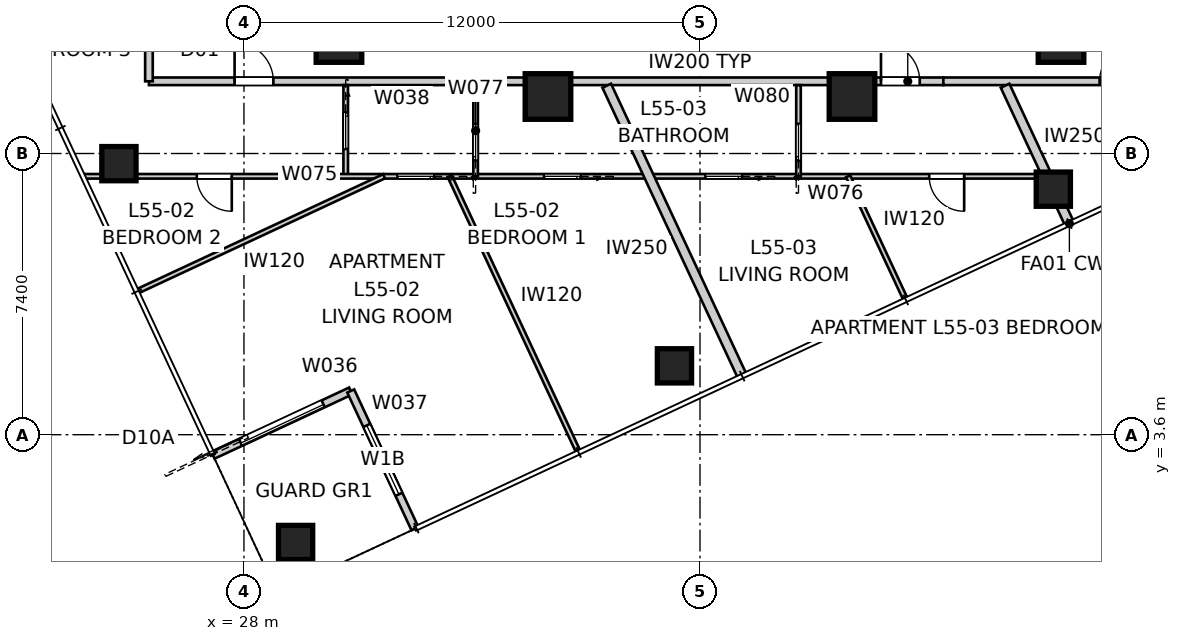
"""IFC4 building model, lengths in metres.
Left out: names, types, materials, properties, quantities, classifications, styles, units other than length and angle.
Written with IfcOpenShell. Run it as: python <this file> out.ifc"""

import sys

from ifc_helpers import new_model, si_unit, direction, frame, frame_2d, origin, origin_2d, place, context, subcontext, project, spatial, rectangle, extrude, element, fill, save


model = new_model("IFC4")
c1 = context("Model", 3, precision=1e-05, world=origin(), true_north=direction((0.0, 1.0)))
c2 = subcontext(c1, "Body", "Model", "MODEL_VIEW")
j1 = project(units=[si_unit("LENGTHUNIT", "METRE"), si_unit("PLANEANGLEUNIT", "RADIAN")], contexts=[c1])
p1 = place(None, origin())
s1 = spatial("IfcSite", under=j1, at=p1, CompositionType="ELEMENT")
p2 = place(p1, origin())
s2 = spatial("IfcBuilding", under=s1, at=p2, CompositionType="ELEMENT")
p3 = place(p2, frame((0.0, 0.0, 199.8)))
s3 = spatial("IfcBuildingStorey", under=s2, at=p3, CompositionType="ELEMENT", Elevation=199.8)
for number, where, z_axis, x_axis in (
    (1, (29.359, 0.764, 0.0), (0.0, 0.0, 1.0), (1.0, 0.0, 0.0)),
    (2, (39.328, 5.412, 0.0), (0.0, 0.0, 1.0), (1.0, 0.0, 0.0)),
    (3, (49.298, 10.061, 0.0), (0.0, 0.0, 1.0), (1.0, 0.0, 0.0)),
    (4, (24.71, 10.733, 0.0), (0.0, 0.0, 1.0), (1.0, 0.0, 0.0)),
):
    element("IfcColumn", number, at=place(p3, frame(where, z_axis=z_axis, x_axis=x_axis)), inside=s3, PredefinedType="COLUMN", context=c2, shape_type="SweptSolid", body=[
        extrude(rectangle(XDim=0.9, YDim=0.9, at=origin_2d()), origin(), (0.0, 0.0, 1.0), 3.2),
    ])
for number, where, z_axis, x_axis in (
    (5, (30.5, 14.0, 0.0), (0.0, 0.0, 1.0), (1.0, 0.0, 0.0)),
    (6, (36.0, 12.5, 0.0), (0.0, 0.0, 1.0), (1.0, 0.0, 0.0)),
    (7, (44.0, 12.5, 0.0), (0.0, 0.0, 1.0), (1.0, 0.0, 0.0)),
    (8, (49.5, 14.0, 0.0), (0.0, 0.0, 1.0), (1.0, 0.0, 0.0)),
):
    element("IfcColumn", number, at=place(p3, frame(where, z_axis=z_axis, x_axis=x_axis)), inside=s3, PredefinedType="COLUMN", context=c2, shape_type="SweptSolid", body=[
        extrude(rectangle(XDim=1.2, YDim=1.2, at=origin_2d()), origin(), (0.0, 0.0, 1.0), 3.4),
    ])
p4 = place(p3, frame((27.185, 3.06, 0.0), z_axis=(0.0, 0.0, 1.0), x_axis=(0.906289140828, 0.422658246362, 0.0)))
e9 = element("IfcWall", 9, at=p4, inside=s3, PredefinedType="SOLIDWALL", context=c2, shape_type="SweptSolid", body=[
    extrude(rectangle(XDim=4.0, YDim=0.2, at=frame_2d((2.0, 0.0))), origin(), (0.0, 0.0, 1.0), 3.2),
])
p5 = place(p4, frame((0.8, 0.0, 0.0)))
e10 = element("IfcOpeningElement", 10, at=p5, cuts=e9, PredefinedType="OPENING", context=c2, shape_type="SweptSolid", body=[
    extrude(rectangle(XDim=2.4, YDim=2.1, at=frame_2d((1.2, 1.05))), frame((0.0, 0.11, 0.0), z_axis=(0.0, -1.0, 0.0), x_axis=(1.0, 0.0, 0.0)), (0.0, 0.0, 1.0), 0.22),
])
p6 = place(p3, frame((30.81, 4.75, 0.0), z_axis=(0.0, 0.0, 1.0), x_axis=(0.422658246362, -0.906289140828, 0.0)))
e11 = element("IfcWall", 11, at=p6, inside=s3, PredefinedType="SOLIDWALL", context=c2, shape_type="SweptSolid", body=[
    extrude(rectangle(XDim=4.0, YDim=0.2, at=frame_2d((2.0, 0.0))), origin(), (0.0, 0.0, 1.0), 3.2),
])
p7 = place(p6, frame((1.0, 0.0, 0.4)))
e12 = element("IfcOpeningElement", 12, at=p7, cuts=e11, PredefinedType="OPENING", context=c2, shape_type="SweptSolid", body=[
    extrude(rectangle(XDim=2.0, YDim=1.8, at=frame_2d((1.0, 0.9))), frame((0.0, 0.11, 0.0), z_axis=(0.0, -1.0, 0.0), x_axis=(1.0, 0.0, 0.0)), (0.0, 0.0, 1.0), 0.22),
])
p8 = place(p3, frame((25.5, 12.9, 0.0), z_axis=(0.0, 0.0, 1.0), x_axis=(1.0, 0.0, 0.0)))
e13 = element("IfcWall", 13, at=p8, inside=s3, PredefinedType="PARTITIONING", context=c2, shape_type="SweptSolid", body=[
    extrude(rectangle(XDim=8.097, YDim=0.2, at=frame_2d((4.048, 0.0))), origin(), (0.0, 0.0, 1.0), 3.2),
])
p9 = place(p8, frame((2.254, 0.0, 0.0)))
e14 = element("IfcOpeningElement", 14, at=p9, cuts=e13, PredefinedType="OPENING", context=c2, shape_type="SweptSolid", body=[
    extrude(rectangle(XDim=1.02, YDim=2.34, at=frame_2d((0.51, 1.17))), frame((0.0, 0.11, 0.0), z_axis=(0.0, -1.0, 0.0), x_axis=(1.0, 0.0, 0.0)), (0.0, 0.0, 1.0), 0.22),
])
p10 = place(p3, frame((33.597, 12.9, 0.0), z_axis=(0.0, 0.0, 1.0), x_axis=(1.0, 0.0, 0.0)))
e15 = element("IfcWall", 15, at=p10, inside=s3, PredefinedType="PARTITIONING", context=c2, shape_type="SweptSolid", body=[
    extrude(rectangle(XDim=1.873, YDim=0.2, at=frame_2d((0.937, 0.0))), origin(), (0.0, 0.0, 1.0), 2.2),
])
p11 = place(p3, frame((35.47, 12.9, 0.0), z_axis=(0.0, 0.0, 1.0), x_axis=(1.0, 0.0, 0.0)))
e16 = element("IfcWall", 16, at=p11, inside=s3, PredefinedType="PARTITIONING", context=c2, shape_type="SweptSolid", body=[
    extrude(rectangle(XDim=9.06, YDim=0.2, at=frame_2d((4.53, 0.0))), origin(), (0.0, 0.0, 1.0), 3.2),
])
p12 = place(p3, frame((44.53, 12.9, 0.0), z_axis=(0.0, 0.0, 1.0), x_axis=(1.0, 0.0, 0.0)))
e17 = element("IfcWall", 17, at=p12, inside=s3, PredefinedType="PARTITIONING", context=c2, shape_type="SweptSolid", body=[
    extrude(rectangle(XDim=1.873, YDim=0.2, at=frame_2d((0.937, 0.0))), origin(), (0.0, 0.0, 1.0), 2.2),
])
p13 = place(p12, frame((0.233, 0.0, 0.0)))
e18 = element("IfcOpeningElement", 18, at=p13, cuts=e17, PredefinedType="OPENING", context=c2, shape_type="SweptSolid", body=[
    extrude(rectangle(XDim=1.02, YDim=2.1, at=frame_2d((0.51, 1.05))), frame((0.0, 0.11, 0.0), z_axis=(0.0, -1.0, 0.0), x_axis=(1.0, 0.0, 0.0)), (0.0, 0.0, 1.0), 0.22),
])
p14 = place(p3, frame((46.403, 12.9, 0.0), z_axis=(0.0, 0.0, 1.0), x_axis=(1.0, 0.0, 0.0)))
e19 = element("IfcWall", 19, at=p14, inside=s3, PredefinedType="PARTITIONING", context=c2, shape_type="SweptSolid", body=[
    extrude(rectangle(XDim=8.097, YDim=0.2, at=frame_2d((4.048, 0.0))), origin(), (0.0, 0.0, 1.0), 3.2),
])
p15 = place(p14, frame((4.112, 0.0, 0.0)))
e20 = element("IfcOpeningElement", 20, at=p15, cuts=e19, PredefinedType="OPENING", context=c2, shape_type="SweptSolid", body=[
    extrude(rectangle(XDim=1.02, YDim=2.34, at=frame_2d((0.51, 1.17))), frame((0.0, 0.11, 0.0), z_axis=(0.0, -1.0, 0.0), x_axis=(1.0, 0.0, 0.0)), (0.0, 0.0, 1.0), 0.22),
])
p16 = place(p3, frame((25.5, 46.7, 0.0), z_axis=(0.0, 0.0, 1.0), x_axis=(0.0, -1.0, 0.0)))
e21 = element("IfcWall", 21, at=p16, inside=s3, PredefinedType="PARTITIONING", context=c2, shape_type="SweptSolid", body=[
    extrude(rectangle(XDim=33.8, YDim=0.2, at=frame_2d((16.9, 0.0))), origin(), (0.0, 0.0, 1.0), 3.2),
])
p17 = place(p16, frame((15.349, 0.0, 0.0)))
e22 = element("IfcOpeningElement", 22, at=p17, cuts=e21, PredefinedType="OPENING", context=c2, shape_type="SweptSolid", body=[
    extrude(rectangle(XDim=1.02, YDim=2.34, at=frame_2d((0.51, 1.17))), frame((0.0, 0.11, 0.0), z_axis=(0.0, -1.0, 0.0), x_axis=(1.0, 0.0, 0.0)), (0.0, 0.0, 1.0), 0.22),
])
p18 = place(p3, frame((49.72, 9.155, 0.0), z_axis=(0.0, 0.0, 1.0), x_axis=(-0.422605017068, 0.906313963011, 0.0)))
e23 = element("IfcWall", 23, at=p18, inside=s3, PredefinedType="PARTITIONING", context=c2, shape_type="SweptSolid", body=[
    extrude(rectangle(XDim=4.003, YDim=0.25, at=frame_2d((2.002, 0.0))), origin(), (0.0, 0.0, 1.0), 3.2),
])
p19 = place(p3, frame((41.11, 5.14, 0.0), z_axis=(0.0, 0.0, 1.0), x_axis=(-0.422625541416, 0.906304392433, 0.0)))
e24 = element("IfcWall", 24, at=p19, inside=s3, PredefinedType="PARTITIONING", context=c2, shape_type="SweptSolid", body=[
    extrude(rectangle(XDim=8.434, YDim=0.25, at=frame_2d((4.217, 0.0))), origin(), (0.0, 0.0, 1.0), 3.2),
])
p20 = place(p3, frame((30.677, 12.8, 0.0), z_axis=(0.0, 0.0, 1.0), x_axis=(0.0, -1.0, 0.0)))
e25 = element("IfcWall", 25, at=p20, inside=s3, PredefinedType="PARTITIONING", context=c2, shape_type="SweptSolid", body=[
    extrude(rectangle(XDim=2.4, YDim=0.12, at=frame_2d((1.2, 0.0))), origin(), (0.0, 0.0, 1.0), 3.2),
])
p21 = place(p20, frame((0.72, 0.0, 0.0)))
e26 = element("IfcOpeningElement", 26, at=p21, cuts=e25, PredefinedType="OPENING", context=c2, shape_type="SweptSolid", body=[
    extrude(rectangle(XDim=0.96, YDim=2.1, at=frame_2d((0.48, 1.05))), frame((0.0, 0.07, 0.0), z_axis=(0.0, -1.0, 0.0), x_axis=(1.0, 0.0, 0.0)), (0.0, 0.0, 1.0), 0.14),
])
p22 = place(p3, frame((49.14, 10.4, 0.0), z_axis=(0.0, 0.0, 1.0), x_axis=(-1.0, 0.0, 0.0)))
e27 = element("IfcWall", 27, at=p22, inside=s3, PredefinedType="PARTITIONING", context=c2, shape_type="SweptSolid", body=[
    extrude(rectangle(XDim=25.333, YDim=0.12, at=frame_2d((12.667, 0.0))), origin(), (0.0, 0.0, 1.0), 3.2),
])
p23 = place(p22, frame((2.188, 0.0, 0.0)))
e28 = element("IfcOpeningElement", 28, at=p23, cuts=e27, PredefinedType="OPENING", context=c2, shape_type="SweptSolid", body=[
    extrude(rectangle(XDim=0.92, YDim=2.34, at=frame_2d((0.46, 1.17))), frame((0.0, 0.07, 0.0), z_axis=(0.0, -1.0, 0.0), x_axis=(1.0, 0.0, 0.0)), (0.0, 0.0, 1.0), 0.14),
])
p24 = place(p22, frame((21.46, 0.0, 0.0)))
e29 = element("IfcOpeningElement", 29, at=p24, cuts=e27, PredefinedType="OPENING", context=c2, shape_type="SweptSolid", body=[
    extrude(rectangle(XDim=0.92, YDim=2.34, at=frame_2d((0.46, 1.17))), frame((0.0, 0.07, 0.0), z_axis=(0.0, -1.0, 0.0), x_axis=(1.0, 0.0, 0.0)), (0.0, 0.0, 1.0), 0.14),
])
p25 = place(p22, frame((8.035, 0.0, 0.0)))
e30 = element("IfcOpeningElement", 30, at=p25, cuts=e27, PredefinedType="OPENING", context=c2, shape_type="SweptSolid", body=[
    extrude(rectangle(XDim=0.96, YDim=2.1, at=frame_2d((0.48, 1.05))), frame((0.0, 0.07, 0.0), z_axis=(0.0, -1.0, 0.0), x_axis=(1.0, 0.0, 0.0)), (0.0, 0.0, 1.0), 0.14),
])
p26 = place(p22, frame((16.14, 0.0, 0.0)))
e31 = element("IfcOpeningElement", 31, at=p26, cuts=e27, PredefinedType="OPENING", context=c2, shape_type="SweptSolid", body=[
    extrude(rectangle(XDim=0.96, YDim=2.1, at=frame_2d((0.48, 1.05))), frame((0.0, 0.07, 0.0), z_axis=(0.0, -1.0, 0.0), x_axis=(1.0, 0.0, 0.0)), (0.0, 0.0, 1.0), 0.14),
])
p27 = place(p22, frame((12.283, 0.0, 0.0)))
e32 = element("IfcOpeningElement", 32, at=p27, cuts=e27, PredefinedType="OPENING", context=c2, shape_type="SweptSolid", body=[
    extrude(rectangle(XDim=0.96, YDim=2.1, at=frame_2d((0.48, 1.05))), frame((0.0, 0.07, 0.0), z_axis=(0.0, -1.0, 0.0), x_axis=(1.0, 0.0, 0.0)), (0.0, 0.0, 1.0), 0.14),
])
p28 = place(p3, frame((34.096, 10.4, 0.0), z_axis=(0.0, 0.0, 1.0), x_axis=(0.0, 1.0, 0.0)))
e33 = element("IfcWall", 33, at=p28, inside=s3, PredefinedType="PARTITIONING", context=c2, shape_type="SweptSolid", body=[
    extrude(rectangle(XDim=2.4, YDim=0.12, at=frame_2d((1.2, 0.0))), origin(), (0.0, 0.0, 1.0), 3.2),
])
p29 = place(p28, frame((0.42, 0.0, 0.0)))
e34 = element("IfcOpeningElement", 34, at=p29, cuts=e33, PredefinedType="OPENING", context=c2, shape_type="SweptSolid", body=[
    extrude(rectangle(XDim=0.96, YDim=2.1, at=frame_2d((0.48, 1.05))), frame((0.0, 0.07, 0.0), z_axis=(0.0, -1.0, 0.0), x_axis=(1.0, 0.0, 0.0)), (0.0, 0.0, 1.0), 0.14),
])
p30 = place(p3, frame((33.417, 10.4, 0.0), z_axis=(0.0, 0.0, 1.0), x_axis=(0.422640876946, -0.90629724105, 0.0)))
e35 = element("IfcWall", 35, at=p30, inside=s3, PredefinedType="PARTITIONING", context=c2, shape_type="SweptSolid", body=[
    extrude(rectangle(XDim=7.979, YDim=0.12, at=frame_2d((3.989, 0.0))), origin(), (0.0, 0.0, 1.0), 3.2),
])
p31 = place(p3, frame((25.213, 7.382, 0.0), z_axis=(0.0, 0.0, 1.0), x_axis=(0.906317589158, 0.422597240388, 0.0)))
e36 = element("IfcWall", 36, at=p31, inside=s3, PredefinedType="PARTITIONING", context=c2, shape_type="SweptSolid", body=[
    extrude(rectangle(XDim=7.142, YDim=0.12, at=frame_2d((3.571, 0.0))), origin(), (0.0, 0.0, 1.0), 3.2),
])
p32 = place(p3, frame((42.592, 10.4, 0.0), z_axis=(0.0, 0.0, 1.0), x_axis=(0.0, 1.0, 0.0)))
e37 = element("IfcWall", 37, at=p32, inside=s3, PredefinedType="PARTITIONING", context=c2, shape_type="SweptSolid", body=[
    extrude(rectangle(XDim=2.4, YDim=0.12, at=frame_2d((1.2, 0.0))), origin(), (0.0, 0.0, 1.0), 3.2),
])
p33 = place(p32, frame((0.42, 0.0, 0.0)))
e38 = element("IfcOpeningElement", 38, at=p33, cuts=e37, PredefinedType="OPENING", context=c2, shape_type="SweptSolid", body=[
    extrude(rectangle(XDim=0.96, YDim=2.1, at=frame_2d((0.48, 1.05))), frame((0.0, 0.07, 0.0), z_axis=(0.0, -1.0, 0.0), x_axis=(1.0, 0.0, 0.0)), (0.0, 0.0, 1.0), 0.14),
])
p34 = place(p3, frame((43.899, 10.4, 0.0), z_axis=(0.0, 0.0, 1.0), x_axis=(0.42263686638, -0.906299111318, 0.0)))
e39 = element("IfcWall", 39, at=p34, inside=s3, PredefinedType="PARTITIONING", context=c2, shape_type="SweptSolid", body=[
    extrude(rectangle(XDim=3.549, YDim=0.12, at=frame_2d((1.774, 0.0))), origin(), (0.0, 0.0, 1.0), 3.2),
])
p35 = place(p5, origin())
e40 = element("IfcDoor", 40, at=p35, inside=s3, OperationType="SLIDING_TO_LEFT", PredefinedType="DOOR", context=c2, shape_type="SweptSolid", body=[
    extrude(rectangle(XDim=2.4, YDim=2.1, at=frame_2d((1.2, 1.05))), frame((0.0, 0.025, 0.0), z_axis=(0.0, -1.0, 0.0), x_axis=(1.0, 0.0, 0.0)), (0.0, 0.0, 1.0), 0.05),
])
fill(e10, e40)
p36 = place(p7, origin())
e41 = element("IfcWindow", 41, at=p36, inside=s3, PartitioningType="SINGLE_PANEL", PredefinedType="WINDOW", context=c2, shape_type="SweptSolid", body=[
    extrude(rectangle(XDim=2.0, YDim=1.8, at=frame_2d((1.0, 0.9))), frame((0.0, 0.03, 0.0), z_axis=(0.0, -1.0, 0.0), x_axis=(1.0, 0.0, 0.0)), (0.0, 0.0, 1.0), 0.06),
])
fill(e12, e41)
p37 = place(p15, origin())
e42 = element("IfcDoor", 42, at=p37, inside=s3, OperationType="SINGLE_SWING_RIGHT", PredefinedType="DOOR", context=c2, shape_type="SweptSolid", body=[
    extrude(rectangle(XDim=1.02, YDim=2.34, at=frame_2d((0.51, 1.17))), frame((0.0, 0.025, 0.0), z_axis=(0.0, -1.0, 0.0), x_axis=(1.0, 0.0, 0.0)), (0.0, 0.0, 1.0), 0.05),
])
fill(e20, e42)
p38 = place(p13, origin())
e43 = element("IfcDoor", 43, at=p38, inside=s3, OperationType="SINGLE_SWING_LEFT", PredefinedType="DOOR", context=c2, shape_type="SweptSolid", body=[
    extrude(rectangle(XDim=1.02, YDim=2.1, at=frame_2d((0.51, 1.05))), frame((0.0, 0.025, 0.0), z_axis=(0.0, -1.0, 0.0), x_axis=(1.0, 0.0, 0.0)), (0.0, 0.0, 1.0), 0.05),
])
fill(e18, e43)
p39 = place(p9, origin())
e44 = element("IfcDoor", 44, at=p39, inside=s3, OperationType="SINGLE_SWING_LEFT", PredefinedType="DOOR", context=c2, shape_type="SweptSolid", body=[
    extrude(rectangle(XDim=1.02, YDim=2.34, at=frame_2d((0.51, 1.17))), frame((0.0, 0.025, 0.0), z_axis=(0.0, -1.0, 0.0), x_axis=(1.0, 0.0, 0.0)), (0.0, 0.0, 1.0), 0.05),
])
fill(e14, e44)
p40 = place(p23, origin())
e45 = element("IfcDoor", 45, at=p40, inside=s3, OperationType="SINGLE_SWING_LEFT", PredefinedType="DOOR", context=c2, shape_type="SweptSolid", body=[
    extrude(rectangle(XDim=0.92, YDim=2.34, at=frame_2d((0.46, 1.17))), frame((0.0, 0.025, 0.0), z_axis=(0.0, -1.0, 0.0), x_axis=(1.0, 0.0, 0.0)), (0.0, 0.0, 1.0), 0.05),
])
fill(e28, e45)
p41 = place(p33, origin())
e46 = element("IfcDoor", 46, at=p41, inside=s3, OperationType="SLIDING_TO_LEFT", PredefinedType="DOOR", context=c2, shape_type="SweptSolid", body=[
    extrude(rectangle(XDim=0.96, YDim=2.1, at=frame_2d((0.48, 1.05))), frame((0.0, 0.025, 0.0), z_axis=(0.0, -1.0, 0.0), x_axis=(1.0, 0.0, 0.0)), (0.0, 0.0, 1.0), 0.05),
])
fill(e38, e46)
p42 = place(p24, origin())
e47 = element("IfcDoor", 47, at=p42, inside=s3, OperationType="SINGLE_SWING_LEFT", PredefinedType="DOOR", context=c2, shape_type="SweptSolid", body=[
    extrude(rectangle(XDim=0.92, YDim=2.34, at=frame_2d((0.46, 1.17))), frame((0.0, 0.025, 0.0), z_axis=(0.0, -1.0, 0.0), x_axis=(1.0, 0.0, 0.0)), (0.0, 0.0, 1.0), 0.05),
])
fill(e29, e47)
p43 = place(p21, origin())
e48 = element("IfcDoor", 48, at=p43, inside=s3, OperationType="SLIDING_TO_LEFT", PredefinedType="DOOR", context=c2, shape_type="SweptSolid", body=[
    extrude(rectangle(XDim=0.96, YDim=2.1, at=frame_2d((0.48, 1.05))), frame((0.0, 0.025, 0.0), z_axis=(0.0, -1.0, 0.0), x_axis=(1.0, 0.0, 0.0)), (0.0, 0.0, 1.0), 0.05),
])
fill(e26, e48)
p44 = place(p25, origin())
e49 = element("IfcDoor", 49, at=p44, inside=s3, OperationType="SLIDING_TO_LEFT", PredefinedType="DOOR", context=c2, shape_type="SweptSolid", body=[
    extrude(rectangle(XDim=0.96, YDim=2.1, at=frame_2d((0.48, 1.05))), frame((0.0, 0.025, 0.0), z_axis=(0.0, -1.0, 0.0), x_axis=(1.0, 0.0, 0.0)), (0.0, 0.0, 1.0), 0.05),
])
fill(e30, e49)
p45 = place(p29, origin())
e50 = element("IfcDoor", 50, at=p45, inside=s3, OperationType="SLIDING_TO_LEFT", PredefinedType="DOOR", context=c2, shape_type="SweptSolid", body=[
    extrude(rectangle(XDim=0.96, YDim=2.1, at=frame_2d((0.48, 1.05))), frame((0.0, 0.025, 0.0), z_axis=(0.0, -1.0, 0.0), x_axis=(1.0, 0.0, 0.0)), (0.0, 0.0, 1.0), 0.05),
])
fill(e34, e50)
p46 = place(p26, origin())
e51 = element("IfcDoor", 51, at=p46, inside=s3, OperationType="SLIDING_TO_LEFT", PredefinedType="DOOR", context=c2, shape_type="SweptSolid", body=[
    extrude(rectangle(XDim=0.96, YDim=2.1, at=frame_2d((0.48, 1.05))), frame((0.0, 0.025, 0.0), z_axis=(0.0, -1.0, 0.0), x_axis=(1.0, 0.0, 0.0)), (0.0, 0.0, 1.0), 0.05),
])
fill(e31, e51)
p47 = place(p27, origin())
e52 = element("IfcDoor", 52, at=p47, inside=s3, OperationType="SLIDING_TO_LEFT", PredefinedType="DOOR", context=c2, shape_type="SweptSolid", body=[
    extrude(rectangle(XDim=0.96, YDim=2.1, at=frame_2d((0.48, 1.05))), frame((0.0, 0.025, 0.0), z_axis=(0.0, -1.0, 0.0), x_axis=(1.0, 0.0, 0.0)), (0.0, 0.0, 1.0), 0.05),
])
fill(e32, e52)
save(model, sys.argv[1])
